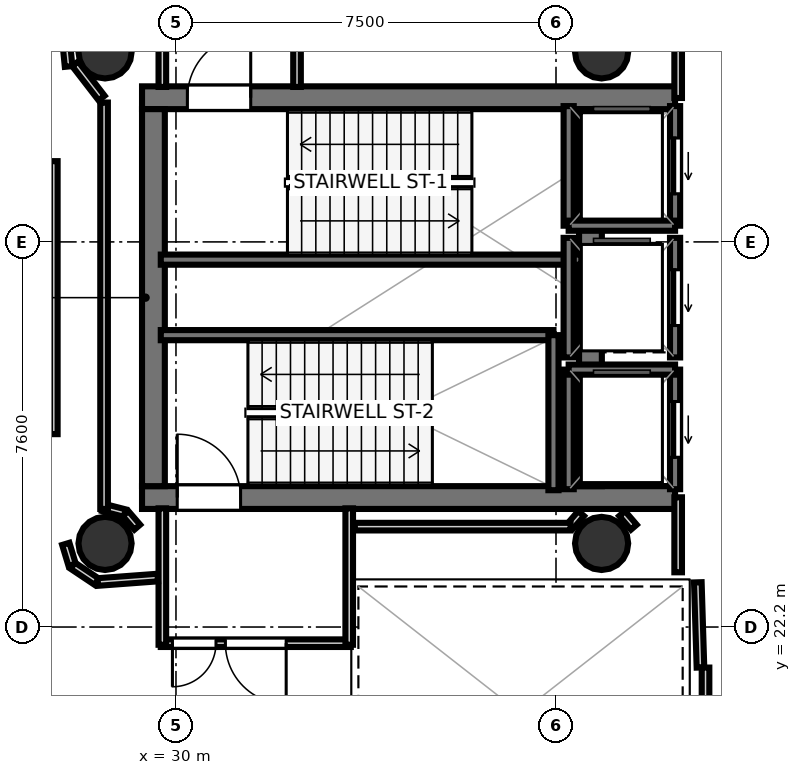
"""IFC4 building model, lengths in metres.
Left out: names, types, materials, properties, quantities, classifications, styles, units other than length and angle.
Written with IfcOpenShell. Run it as: python <this file> out.ifc"""

import sys

from ifc_helpers import new_model, si_unit, direction, frame, frame_2d, origin, origin_2d, place, context, subcontext, project, spatial, rectangle, hollow_circle, extrude, element, fill, save


model = new_model("IFC4")
c1 = context("Model", 3, precision=1e-05, world=origin(), true_north=direction((0.0, 1.0)))
c2 = subcontext(c1, "Body", "Model", "MODEL_VIEW")
j1 = project(units=[si_unit("LENGTHUNIT", "METRE"), si_unit("PLANEANGLEUNIT", "RADIAN")], contexts=[c1])
p1 = place(None, origin())
s1 = spatial("IfcSite", under=j1, at=p1, CompositionType="ELEMENT")
p2 = place(p1, origin())
s2 = spatial("IfcBuilding", under=s1, at=p2, CompositionType="ELEMENT")
p3 = place(p2, frame((0.0, 0.0, 276.0)))
s3 = spatial("IfcBuildingStorey", under=s2, at=p3, CompositionType="ELEMENT", Elevation=276.0)
p4 = place(p3, frame((29.33, 32.645, 0.0), z_axis=(0.0, 0.0, 1.0), x_axis=(1.0, 0.0, 0.0)))
e1 = element("IfcWall", 1, at=p4, inside=s3, PredefinedType="SHEAR", context=c2, shape_type="SweptSolid", body=[
    extrude(rectangle(XDim=10.52, YDim=0.45, at=frame_2d((5.26, 0.0))), origin(), (0.0, 0.0, 1.0), 4.42),
])
p5 = place(p4, frame((0.895, 0.0, 0.0)))
e2 = element("IfcOpeningElement", 2, at=p5, cuts=e1, PredefinedType="OPENING", context=c2, shape_type="SweptSolid", body=[
    extrude(rectangle(XDim=1.25, YDim=2.15, at=frame_2d((0.625, 1.075))), frame((0.0, 0.235, 0.0), z_axis=(0.0, -1.0, 0.0), x_axis=(1.0, 0.0, 0.0)), (0.0, 0.0, 1.0), 0.47),
])
p6 = place(p3, frame((29.33, 24.755, 0.0), z_axis=(0.0, 0.0, 1.0), x_axis=(1.0, 0.0, 0.0)))
e3 = element("IfcWall", 3, at=p6, inside=s3, PredefinedType="SHEAR", context=c2, shape_type="SweptSolid", body=[
    extrude(rectangle(XDim=10.52, YDim=0.45, at=frame_2d((5.26, 0.0))), origin(), (0.0, 0.0, 1.0), 4.42),
])
p7 = place(p6, frame((0.695, 0.0, 0.0)))
e4 = element("IfcOpeningElement", 4, at=p7, cuts=e3, PredefinedType="OPENING", context=c2, shape_type="SweptSolid", body=[
    extrude(rectangle(XDim=1.25, YDim=2.15, at=frame_2d((0.625, 1.075))), frame((0.0, 0.235, 0.0), z_axis=(0.0, -1.0, 0.0), x_axis=(1.0, 0.0, 0.0)), (0.0, 0.0, 1.0), 0.47),
])
for number, where, z_axis, x_axis in (
    (5, (29.555, 24.98, 0.0), (0.0, 0.0, 1.0), (0.0, 1.0, 0.0)),
    (6, (38.18, 24.98, 0.0), (0.0, 0.0, 1.0), (0.0, 1.0, 0.0)),
):
    element("IfcWall", number, at=place(p3, frame(where, z_axis=z_axis, x_axis=x_axis)), inside=s3, PredefinedType="SHEAR", context=c2, shape_type="SweptSolid", body=[
        extrude(rectangle(XDim=7.44, YDim=0.45, at=frame_2d((3.72, 0.0))), origin(), (0.0, 0.0, 1.0), 4.42),
    ])
for number, where, z_axis, x_axis in (
    (7, (28.6, 33.55, 0.0), (0.0, 0.0, 1.0), (1.0, 0.0, 0.0)),
    (8, (28.6, 23.85, 0.0), (0.0, 0.0, 1.0), (1.0, 0.0, 0.0)),
    (9, (38.4, 33.55, 0.0), (0.0, 0.0, 1.0), (1.0, 0.0, 0.0)),
    (10, (38.4, 23.85, 0.0), (0.0, 0.0, 1.0), (1.0, 0.0, 0.0)),
):
    element("IfcColumn", number, at=place(p3, frame(where, z_axis=z_axis, x_axis=x_axis)), inside=s3, PredefinedType="COLUMN", context=c2, shape_type="SweptSolid", body=[
        extrude(hollow_circle(Radius=0.525, WallThickness=0.028, at=origin_2d()), origin(), (0.0, 0.0, 1.0), 4.6),
    ])
p8 = place(p3, frame((29.7, 29.45, 0.0), z_axis=(0.0, 0.0, 1.0), x_axis=(1.0, 0.0, 0.0)))
e11 = element("IfcWall", 11, at=p8, inside=s3, PredefinedType="SOLIDWALL", context=c2, shape_type="SweptSolid", body=[
    extrude(rectangle(XDim=8.3, YDim=0.2, at=frame_2d((4.15, 0.0))), origin(), (0.0, 0.0, 1.0), 4.42),
])
p9 = place(p3, frame((29.7, 27.96, 0.0), z_axis=(0.0, 0.0, 1.0), x_axis=(1.0, 0.0, 0.0)))
e12 = element("IfcWall", 12, at=p9, inside=s3, PredefinedType="SOLIDWALL", context=c2, shape_type="SweptSolid", body=[
    extrude(rectangle(XDim=7.75, YDim=0.2, at=frame_2d((3.875, 0.0))), origin(), (0.0, 0.0, 1.0), 4.42),
])
p10 = place(p3, frame((37.45, 24.9, 0.0), z_axis=(0.0, 0.0, 1.0), x_axis=(0.0, 1.0, 0.0)))
e13 = element("IfcWall", 13, at=p10, inside=s3, PredefinedType="SOLIDWALL", context=c2, shape_type="SweptSolid", body=[
    extrude(rectangle(XDim=3.06, YDim=0.2, at=frame_2d((1.53, 0.0))), origin(), (0.0, 0.0, 1.0), 4.42),
])
p11 = place(p3, frame((39.85, 30.12, 0.0), z_axis=(0.0, 0.0, 1.0), x_axis=(0.0, 1.0, 0.0)))
e14 = element("IfcWall", 14, at=p11, inside=s3, PredefinedType="SOLIDWALL", context=c2, shape_type="SweptSolid", body=[
    extrude(rectangle(XDim=2.36, YDim=0.2, at=frame_2d((1.18, 0.0))), origin(), (0.0, 0.0, 1.0), 4.42),
])
p12 = place(p11, frame((0.63, 0.0, 0.0)))
e15 = element("IfcOpeningElement", 15, at=p12, cuts=e14, PredefinedType="OPENING", context=c2, shape_type="SweptSolid", body=[
    extrude(rectangle(XDim=1.1, YDim=2.15, at=frame_2d((0.55, 1.075))), frame((0.0, 0.11, 0.0), z_axis=(0.0, -1.0, 0.0), x_axis=(1.0, 0.0, 0.0)), (0.0, 0.0, 1.0), 0.22),
])
p13 = place(p3, frame((37.75, 30.12, 0.0), z_axis=(0.0, 0.0, 1.0), x_axis=(0.0, 1.0, 0.0)))
e16 = element("IfcWall", 16, at=p13, inside=s3, PredefinedType="SOLIDWALL", context=c2, shape_type="SweptSolid", body=[
    extrude(rectangle(XDim=2.36, YDim=0.2, at=frame_2d((1.18, 0.0))), origin(), (0.0, 0.0, 1.0), 4.42),
])
p14 = place(p3, frame((37.75, 30.12, 0.0), z_axis=(0.0, 0.0, 1.0), x_axis=(1.0, 0.0, 0.0)))
e17 = element("IfcWall", 17, at=p14, inside=s3, PredefinedType="SOLIDWALL", context=c2, shape_type="SweptSolid", body=[
    extrude(rectangle(XDim=2.1, YDim=0.2, at=frame_2d((1.05, 0.0))), origin(), (0.0, 0.0, 1.0), 4.42),
])
p15 = place(p3, frame((39.85, 24.92, 0.0), z_axis=(0.0, 0.0, 1.0), x_axis=(0.0, 1.0, 0.0)))
e18 = element("IfcWall", 18, at=p15, inside=s3, PredefinedType="SOLIDWALL", context=c2, shape_type="SweptSolid", body=[
    extrude(rectangle(XDim=2.36, YDim=0.2, at=frame_2d((1.18, 0.0))), origin(), (0.0, 0.0, 1.0), 4.42),
])
p16 = place(p15, frame((0.63, 0.0, 0.0)))
e19 = element("IfcOpeningElement", 19, at=p16, cuts=e18, PredefinedType="OPENING", context=c2, shape_type="SweptSolid", body=[
    extrude(rectangle(XDim=1.1, YDim=2.15, at=frame_2d((0.55, 1.075))), frame((0.0, 0.11, 0.0), z_axis=(0.0, -1.0, 0.0), x_axis=(1.0, 0.0, 0.0)), (0.0, 0.0, 1.0), 0.22),
])
p17 = place(p3, frame((37.75, 24.92, 0.0), z_axis=(0.0, 0.0, 1.0), x_axis=(0.0, 1.0, 0.0)))
e20 = element("IfcWall", 20, at=p17, inside=s3, PredefinedType="SOLIDWALL", context=c2, shape_type="SweptSolid", body=[
    extrude(rectangle(XDim=2.36, YDim=0.2, at=frame_2d((1.18, 0.0))), origin(), (0.0, 0.0, 1.0), 4.42),
])
p18 = place(p3, frame((37.75, 27.28, 0.0), z_axis=(0.0, 0.0, 1.0), x_axis=(1.0, 0.0, 0.0)))
e21 = element("IfcWall", 21, at=p18, inside=s3, PredefinedType="SOLIDWALL", context=c2, shape_type="SweptSolid", body=[
    extrude(rectangle(XDim=2.1, YDim=0.2, at=frame_2d((1.05, 0.0))), origin(), (0.0, 0.0, 1.0), 4.42),
])
p19 = place(p3, frame((39.85, 27.52, 0.0), z_axis=(0.0, 0.0, 1.0), x_axis=(0.0, 1.0, 0.0)))
e22 = element("IfcWall", 22, at=p19, inside=s3, PredefinedType="SOLIDWALL", context=c2, shape_type="SweptSolid", body=[
    extrude(rectangle(XDim=2.36, YDim=0.2, at=frame_2d((1.18, 0.0))), origin(), (0.0, 0.0, 1.0), 4.42),
])
p20 = place(p19, frame((0.63, 0.0, 0.0)))
e23 = element("IfcOpeningElement", 23, at=p20, cuts=e22, PredefinedType="OPENING", context=c2, shape_type="SweptSolid", body=[
    extrude(rectangle(XDim=1.1, YDim=2.15, at=frame_2d((0.55, 1.075))), frame((0.0, 0.11, 0.0), z_axis=(0.0, -1.0, 0.0), x_axis=(1.0, 0.0, 0.0)), (0.0, 0.0, 1.0), 0.22),
])
p21 = place(p3, frame((37.75, 27.52, 0.0), z_axis=(0.0, 0.0, 1.0), x_axis=(0.0, 1.0, 0.0)))
e24 = element("IfcWall", 24, at=p21, inside=s3, PredefinedType="SOLIDWALL", context=c2, shape_type="SweptSolid", body=[
    extrude(rectangle(XDim=2.36, YDim=0.2, at=frame_2d((1.18, 0.0))), origin(), (0.0, 0.0, 1.0), 4.42),
])
p22 = place(p3, frame((29.731, 32.858, 0.0), z_axis=(0.0, 0.0, 1.0), x_axis=(0.0, 1.0, 0.0)))
e25 = element("IfcWall", 25, at=p22, inside=s3, PredefinedType="PARTITIONING", context=c2, shape_type="SweptSolid", body=[
    extrude(rectangle(XDim=3.357, YDim=0.15, at=frame_2d((1.679, 0.0))), origin(), (0.0, 0.0, 1.0), 2.94),
])
p23 = place(p3, frame((32.389, 36.504, 0.0), z_axis=(0.0, 0.0, 1.0), x_axis=(0.0, -1.0, 0.0)))
e26 = element("IfcWall", 26, at=p23, inside=s3, PredefinedType="PARTITIONING", context=c2, shape_type="SweptSolid", body=[
    extrude(rectangle(XDim=3.646, YDim=0.15, at=frame_2d((1.823, 0.0))), origin(), (0.0, 0.0, 1.0), 2.94),
])
p24 = place(p3, frame((33.45, 21.881, 0.0), z_axis=(0.0, 0.0, 1.0), x_axis=(-1.0, 0.0, 0.0)))
e27 = element("IfcWall", 27, at=p24, inside=s3, PredefinedType="PARTITIONING", context=c2, shape_type="SweptSolid", body=[
    extrude(rectangle(XDim=3.75, YDim=0.15, at=frame_2d((1.875, 0.0))), origin(), (0.0, 0.0, 1.0), 2.94),
])
p25 = place(p24, frame((1.275, 0.0, 0.0)))
e28 = element("IfcOpeningElement", 28, at=p25, cuts=e27, PredefinedType="OPENING", context=c2, shape_type="SweptSolid", body=[
    extrude(rectangle(XDim=1.2, YDim=2.15, at=frame_2d((0.6, 1.075))), frame((0.0, 0.085, 0.0), z_axis=(0.0, -1.0, 0.0), x_axis=(1.0, 0.0, 0.0)), (0.0, 0.0, 1.0), 0.17),
])
p26 = place(p24, frame((2.66, 0.0, 0.0)))
e29 = element("IfcOpeningElement", 29, at=p26, cuts=e27, PredefinedType="OPENING", context=c2, shape_type="SweptSolid", body=[
    extrude(rectangle(XDim=0.86, YDim=2.05, at=frame_2d((0.43, 1.025))), frame((0.0, 0.085, 0.0), z_axis=(0.0, -1.0, 0.0), x_axis=(1.0, 0.0, 0.0)), (0.0, 0.0, 1.0), 0.17),
])
for number, where, z_axis, x_axis in (
    (30, (29.731, 21.85, 0.0), (0.0, 0.0, 1.0), (0.0, 1.0, 0.0)),
    (31, (33.419, 24.542, 0.0), (0.0, 0.0, 1.0), (0.0, -1.0, 0.0)),
):
    element("IfcWall", number, at=place(p3, frame(where, z_axis=z_axis, x_axis=x_axis)), inside=s3, PredefinedType="PARTITIONING", context=c2, shape_type="SweptSolid", body=[
        extrude(rectangle(XDim=2.692, YDim=0.15, at=frame_2d((1.346, 0.0))), origin(), (0.0, 0.0, 1.0), 2.94),
    ])
p27 = place(p3, frame((40.351, 21.401, 0.0), z_axis=(0.0, 0.0, 1.0), x_axis=(-0.031058045979, 0.999517582527, 0.0)))
e32 = element("IfcWall", 32, at=p27, inside=s3, PredefinedType="PARTITIONING", context=c2, shape_type="SweptSolid", body=[
    extrude(rectangle(XDim=1.682, YDim=0.15, at=frame_2d((0.841, 0.0))), origin(), (0.0, 0.0, 1.0), 2.94),
])
p28 = place(p3, frame((39.911, 23.28, 0.0), z_axis=(0.0, 0.0, 1.0), x_axis=(0.0, 1.0, 0.0)))
e33 = element("IfcWall", 33, at=p28, inside=s3, PredefinedType="PARTITIONING", context=c2, shape_type="SweptSolid", body=[
    extrude(rectangle(XDim=1.48, YDim=0.15, at=frame_2d((0.74, 0.0))), origin(), (0.0, 0.0, 1.0), 2.94),
])
p29 = place(p3, frame((39.911, 32.64, 0.0), z_axis=(0.0, 0.0, 1.0), x_axis=(0.0, 1.0, 0.0)))
e34 = element("IfcWall", 34, at=p29, inside=s3, PredefinedType="PARTITIONING", context=c2, shape_type="SweptSolid", body=[
    extrude(rectangle(XDim=2.88, YDim=0.15, at=frame_2d((1.44, 0.0))), origin(), (0.0, 0.0, 1.0), 2.94),
])
p30 = place(p3, frame((40.451, 18.08, 0.0), z_axis=(0.0, 0.0, 1.0), x_axis=(0.0, 1.0, 0.0)))
e35 = element("IfcWall", 35, at=p30, inside=s3, PredefinedType="PARTITIONING", context=c2, shape_type="SweptSolid", body=[
    extrude(rectangle(XDim=3.32, YDim=0.15, at=frame_2d((1.66, 0.0))), origin(), (0.0, 0.0, 1.0), 2.94),
])
p31 = place(p3, frame((29.236, 24.17, 0.0), z_axis=(0.0, 0.0, 1.0), x_axis=(-0.652260263346, 0.757995084984, 0.0)))
e36 = element("IfcWall", 36, at=p31, inside=s3, PredefinedType="PARTITIONING", context=c2, shape_type="SweptSolid", body=[
    extrude(rectangle(XDim=0.355, YDim=0.15, at=frame_2d((0.178, 0.0))), origin(), (0.0, 0.0, 1.0), 2.94),
])
p32 = place(p3, frame((28.988, 24.45, 0.0), z_axis=(0.0, 0.0, 1.0), x_axis=(-0.968704505916, 0.248216800836, 0.0)))
e37 = element("IfcWall", 37, at=p32, inside=s3, PredefinedType="PARTITIONING", context=c2, shape_type="SweptSolid", body=[
    extrude(rectangle(XDim=0.445, YDim=0.15, at=frame_2d((0.222, 0.0))), origin(), (0.0, 0.0, 1.0), 2.94),
])
p33 = place(p3, frame((28.581, 24.53, 0.0), z_axis=(0.0, 0.0, 1.0), x_axis=(0.0, 1.0, 0.0)))
e38 = element("IfcWall", 38, at=p33, inside=s3, PredefinedType="PARTITIONING", context=c2, shape_type="SweptSolid", body=[
    extrude(rectangle(XDim=8.02, YDim=0.15, at=frame_2d((4.01, 0.0))), origin(), (0.0, 0.0, 1.0), 2.94),
])
p34 = place(p3, frame((39.036, 24.17, 0.0), z_axis=(0.0, 0.0, 1.0), x_axis=(-0.652260263346, 0.757995084984, 0.0)))
e39 = element("IfcWall", 39, at=p34, inside=s3, PredefinedType="PARTITIONING", context=c2, shape_type="SweptSolid", body=[
    extrude(rectangle(XDim=0.355, YDim=0.15, at=frame_2d((0.178, 0.0))), origin(), (0.0, 0.0, 1.0), 2.94),
])
p35 = place(p3, frame((37.996, 24.44, 0.0), z_axis=(0.0, 0.0, 1.0), x_axis=(-0.652425645794, -0.757852740782, 0.0)))
e40 = element("IfcWall", 40, at=p35, inside=s3, PredefinedType="PARTITIONING", context=c2, shape_type="SweptSolid", body=[
    extrude(rectangle(XDim=0.32, YDim=0.15, at=frame_2d((0.16, 0.0))), origin(), (0.0, 0.0, 1.0), 2.94),
])
p36 = place(p3, frame((37.787, 24.181, 0.0), z_axis=(0.0, 0.0, 1.0), x_axis=(-1.0, 0.0, 0.0)))
e41 = element("IfcWall", 41, at=p36, inside=s3, PredefinedType="PARTITIONING", context=c2, shape_type="SweptSolid", body=[
    extrude(rectangle(XDim=4.257, YDim=0.15, at=frame_2d((2.129, 0.0))), origin(), (0.0, 0.0, 1.0), 2.94),
])
p37 = place(p3, frame((27.838, 33.692, 0.0), z_axis=(0.0, 0.0, 1.0), x_axis=(0.098218203714, -0.995164903149, 0.0)))
e42 = element("IfcWall", 42, at=p37, inside=s3, PredefinedType="PARTITIONING", context=c2, shape_type="SweptSolid", body=[
    extrude(rectangle(XDim=0.433, YDim=0.15, at=frame_2d((0.216, 0.0))), origin(), (0.0, 0.0, 1.0), 2.94),
])
p38 = place(p3, frame((27.589, 31.394, 0.0), z_axis=(0.0, 0.0, 1.0), x_axis=(0.0, -1.0, 0.0)))
e43 = element("IfcWall", 43, at=p38, inside=s3, PredefinedType="PARTITIONING", context=c2, shape_type="SweptSolid", body=[
    extrude(rectangle(XDim=5.388, YDim=0.15, at=frame_2d((2.694, 0.0))), origin(), (0.0, 0.0, 1.0), 2.94),
])
p39 = place(p3, frame((27.825, 23.841, 0.0), z_axis=(0.0, 0.0, 1.0), x_axis=(0.290555399837, -0.956858171113, 0.0)))
e44 = element("IfcWall", 44, at=p39, inside=s3, PredefinedType="PARTITIONING", context=c2, shape_type="SweptSolid", body=[
    extrude(rectangle(XDim=0.433, YDim=0.15, at=frame_2d((0.216, 0.0))), origin(), (0.0, 0.0, 1.0), 2.94),
])
p40 = place(p3, frame((27.963, 23.41, 0.0), z_axis=(0.0, 0.0, 1.0), x_axis=(0.831391075887, -0.555687753091, 0.0)))
e45 = element("IfcWall", 45, at=p40, inside=s3, PredefinedType="PARTITIONING", context=c2, shape_type="SweptSolid", body=[
    extrude(rectangle(XDim=0.57, YDim=0.15, at=frame_2d((0.285, 0.0))), origin(), (0.0, 0.0, 1.0), 2.94),
])
p41 = place(p3, frame((28.457, 23.088, 0.0), z_axis=(0.0, 0.0, 1.0), x_axis=(0.997253139061, 0.074068729124, 0.0)))
e46 = element("IfcWall", 46, at=p41, inside=s3, PredefinedType="PARTITIONING", context=c2, shape_type="SweptSolid", body=[
    extrude(rectangle(XDim=1.187, YDim=0.15, at=frame_2d((0.593, 0.0))), origin(), (0.0, 0.0, 1.0), 2.94),
])
p42 = place(p3, frame((28.532, 32.639, 0.0), z_axis=(0.0, 0.0, 1.0), x_axis=(-0.610926400845, 0.791687395852, 0.0)))
e47 = element("IfcWall", 47, at=p42, inside=s3, PredefinedType="PARTITIONING", context=c2, shape_type="SweptSolid", body=[
    extrude(rectangle(XDim=0.854, YDim=0.15, at=frame_2d((0.427, 0.0))), origin(), (0.0, 0.0, 1.0), 2.94),
])
p43 = place(p5, origin())
e48 = element("IfcDoor", 48, at=p43, inside=s3, OperationType="SINGLE_SWING_RIGHT", PredefinedType="DOOR", context=c2, shape_type="SweptSolid", body=[
    extrude(rectangle(XDim=1.25, YDim=2.15, at=frame_2d((0.625, 1.075))), frame((0.0, 0.025, 0.0), z_axis=(0.0, -1.0, 0.0), x_axis=(1.0, 0.0, 0.0)), (0.0, 0.0, 1.0), 0.05),
])
fill(e2, e48)
p44 = place(p7, origin())
e49 = element("IfcDoor", 49, at=p44, inside=s3, OperationType="SINGLE_SWING_LEFT", PredefinedType="DOOR", context=c2, shape_type="SweptSolid", body=[
    extrude(rectangle(XDim=1.25, YDim=2.15, at=frame_2d((0.625, 1.075))), frame((0.0, 0.025, 0.0), z_axis=(0.0, -1.0, 0.0), x_axis=(1.0, 0.0, 0.0)), (0.0, 0.0, 1.0), 0.05),
])
fill(e4, e49)
p45 = place(p12, origin())
e50 = element("IfcDoor", 50, at=p45, inside=s3, OperationType="SLIDING_TO_LEFT", PredefinedType="DOOR", context=c2, shape_type="SweptSolid", body=[
    extrude(rectangle(XDim=1.1, YDim=2.15, at=frame_2d((0.55, 1.075))), frame((0.0, 0.025, 0.0), z_axis=(0.0, -1.0, 0.0), x_axis=(1.0, 0.0, 0.0)), (0.0, 0.0, 1.0), 0.05),
])
fill(e15, e50)
p46 = place(p16, origin())
e51 = element("IfcDoor", 51, at=p46, inside=s3, OperationType="SLIDING_TO_LEFT", PredefinedType="DOOR", context=c2, shape_type="SweptSolid", body=[
    extrude(rectangle(XDim=1.1, YDim=2.15, at=frame_2d((0.55, 1.075))), frame((0.0, 0.025, 0.0), z_axis=(0.0, -1.0, 0.0), x_axis=(1.0, 0.0, 0.0)), (0.0, 0.0, 1.0), 0.05),
])
fill(e19, e51)
p47 = place(p20, origin())
e52 = element("IfcDoor", 52, at=p47, inside=s3, OperationType="SLIDING_TO_LEFT", PredefinedType="DOOR", context=c2, shape_type="SweptSolid", body=[
    extrude(rectangle(XDim=1.1, YDim=2.15, at=frame_2d((0.55, 1.075))), frame((0.0, 0.025, 0.0), z_axis=(0.0, -1.0, 0.0), x_axis=(1.0, 0.0, 0.0)), (0.0, 0.0, 1.0), 0.05),
])
fill(e23, e52)
p48 = place(p25, origin())
e53 = element("IfcDoor", 53, at=p48, inside=s3, OperationType="SINGLE_SWING_LEFT", PredefinedType="DOOR", context=c2, shape_type="SweptSolid", body=[
    extrude(rectangle(XDim=1.2, YDim=2.15, at=frame_2d((0.6, 1.075))), frame((0.0, 0.025, 0.0), z_axis=(0.0, -1.0, 0.0), x_axis=(1.0, 0.0, 0.0)), (0.0, 0.0, 1.0), 0.05),
])
fill(e28, e53)
p49 = place(p26, origin())
e54 = element("IfcDoor", 54, at=p49, inside=s3, OperationType="SINGLE_SWING_RIGHT", PredefinedType="DOOR", context=c2, shape_type="SweptSolid", body=[
    extrude(rectangle(XDim=0.86, YDim=2.05, at=frame_2d((0.43, 1.025))), frame((0.0, 0.025, 0.0), z_axis=(0.0, -1.0, 0.0), x_axis=(1.0, 0.0, 0.0)), (0.0, 0.0, 1.0), 0.05),
])
fill(e29, e54)
save(model, sys.argv[1])
